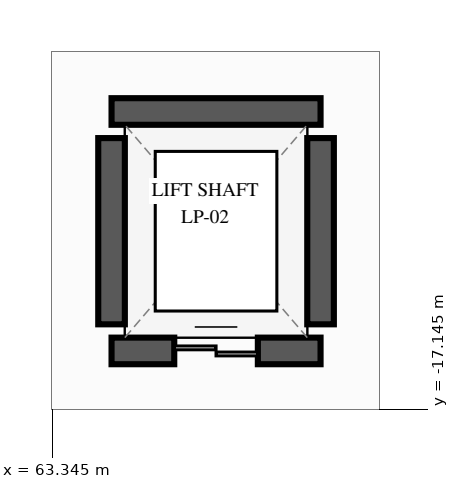
"""IFC4 building model, lengths in metres.
Left out: names, types, materials, properties, quantities, classifications, styles, units other than length and angle.
Written with IfcOpenShell. Run it as: python <this file> out.ifc"""

import sys

from ifc_helpers import new_model, si_unit, direction, frame, frame_2d, origin, place, context, subcontext, project, spatial, rectangle, extrude, element, fill, save


model = new_model("IFC4")
c1 = context("Model", 3, precision=1e-05, world=origin(), true_north=direction((0.0, 1.0)))
c2 = subcontext(c1, "Body", "Model", "MODEL_VIEW")
j1 = project(units=[si_unit("LENGTHUNIT", "METRE"), si_unit("PLANEANGLEUNIT", "RADIAN")], contexts=[c1])
p1 = place(None, origin())
s1 = spatial("IfcSite", under=j1, at=p1, CompositionType="ELEMENT")
p2 = place(p1, origin())
s2 = spatial("IfcBuilding", under=s1, at=p2, CompositionType="ELEMENT")
p3 = place(p2, frame((0.0, 0.0, 16.2)))
s3 = spatial("IfcBuildingStorey", under=s2, at=p3, CompositionType="ELEMENT", Elevation=16.2)
p4 = place(p3, frame((64.125, -16.375, 0.0), z_axis=(0.0, 0.0, 1.0), x_axis=(1.0, 0.0, 0.0)))
e1 = element("IfcWall", 1, at=p4, inside=s3, PredefinedType="SHEAR", context=c2, shape_type="SweptSolid", body=[
    extrude(rectangle(XDim=2.75, YDim=0.35, at=frame_2d((1.375, 0.0))), origin(), (0.0, 0.0, 1.0), 5.15),
])
p5 = place(p4, frame((0.825, 0.0, 0.0)))
e2 = element("IfcOpeningElement", 2, at=p5, cuts=e1, PredefinedType="OPENING", context=c2, shape_type="SweptSolid", body=[
    extrude(rectangle(XDim=1.1, YDim=2.2, at=frame_2d((0.55, 1.1))), frame((0.0, 0.185, 0.0), z_axis=(0.0, -1.0, 0.0), x_axis=(1.0, 0.0, 0.0)), (0.0, 0.0, 1.0), 0.37),
])
p6 = place(p3, frame((66.875, -13.225, 0.0), z_axis=(0.0, 0.0, 1.0), x_axis=(-1.0, 0.0, 0.0)))
e3 = element("IfcWall", 3, at=p6, inside=s3, PredefinedType="SHEAR", context=c2, shape_type="SweptSolid", body=[
    extrude(rectangle(XDim=2.75, YDim=0.35, at=frame_2d((1.375, 0.0))), origin(), (0.0, 0.0, 1.0), 5.15),
])
for number, where, z_axis, x_axis in (
    (4, (64.125, -16.025, 0.0), (0.0, 0.0, 1.0), (0.0, 1.0, 0.0)),
    (5, (66.875, -16.025, 0.0), (0.0, 0.0, 1.0), (0.0, 1.0, 0.0)),
):
    element("IfcWall", number, at=place(p3, frame(where, z_axis=z_axis, x_axis=x_axis)), inside=s3, PredefinedType="SHEAR", context=c2, shape_type="SweptSolid", body=[
        extrude(rectangle(XDim=2.45, YDim=0.35, at=frame_2d((1.225, 0.0))), origin(), (0.0, 0.0, 1.0), 5.15),
    ])
p7 = place(p5, origin())
e6 = element("IfcDoor", 6, at=p7, inside=s3, OperationType="DOUBLE_DOOR_SLIDING", PredefinedType="DOOR", context=c2, shape_type="SweptSolid", body=[
    extrude(rectangle(XDim=1.1, YDim=2.2, at=frame_2d((0.55, 1.1))), frame((0.0, 0.025, 0.0), z_axis=(0.0, -1.0, 0.0), x_axis=(1.0, 0.0, 0.0)), (0.0, 0.0, 1.0), 0.05),
])
fill(e2, e6)
save(model, sys.argv[1])
